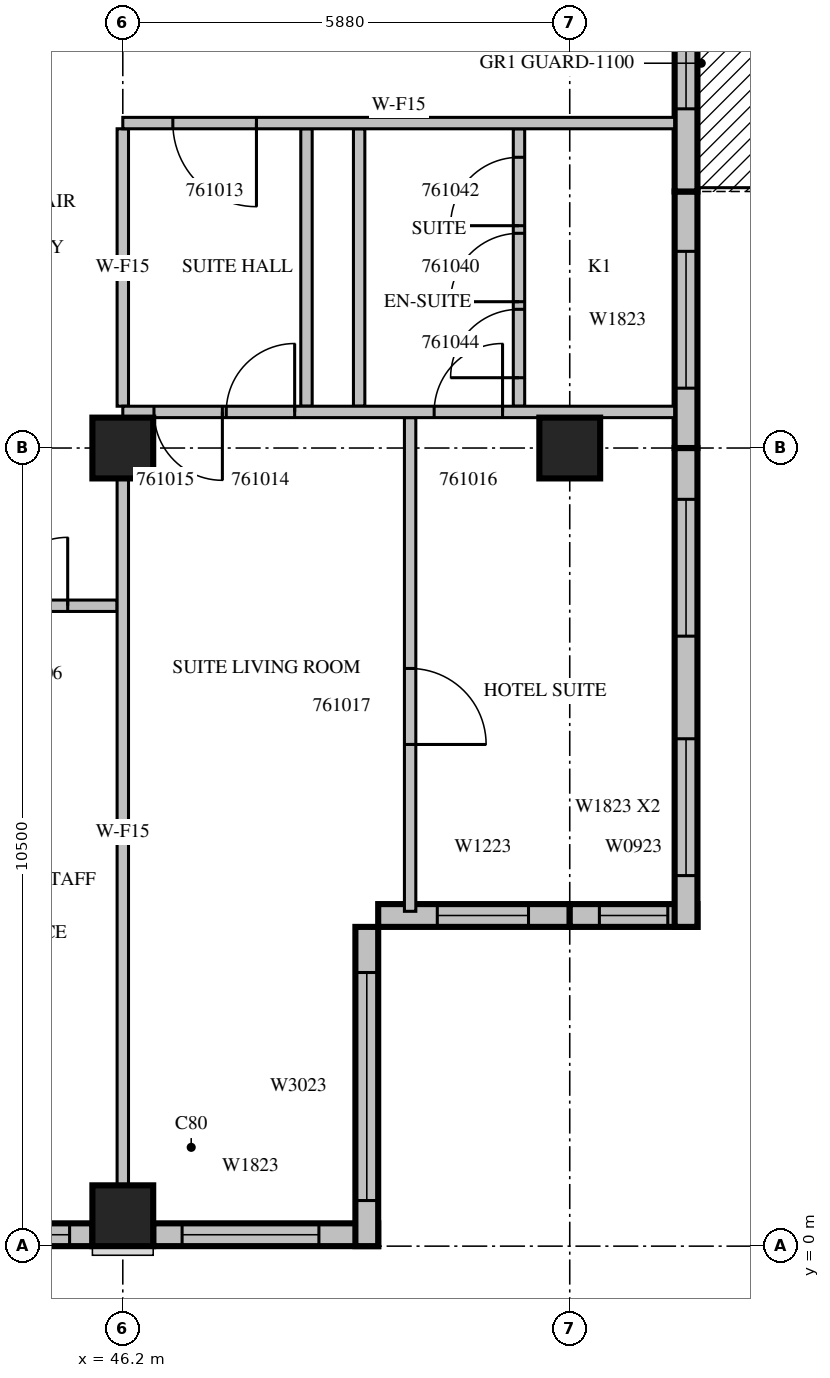
"""IFC4 building model, lengths in metres.
Left out: names, types, materials, properties, quantities, classifications, styles, units other than length and angle.
Written with IfcOpenShell. Run it as: python <this file> out.ifc"""

import sys

from ifc_helpers import new_model, si_unit, direction, frame, frame_2d, origin, origin_2d, place, context, subcontext, project, spatial, rectangle, extrude, source, transform, mapped, element, fill, save


model = new_model("IFC4")
c1 = context("Model", 3, precision=1e-05, world=origin(), true_north=direction((0.0, 1.0)))
c2 = subcontext(c1, "Body", "Model", "MODEL_VIEW")
j1 = project(units=[si_unit("LENGTHUNIT", "METRE"), si_unit("PLANEANGLEUNIT", "RADIAN")], contexts=[c1])
p1 = place(None, origin())
s1 = spatial("IfcSite", under=j1, at=p1, CompositionType="ELEMENT")
p2 = place(p1, origin())
s2 = spatial("IfcBuilding", under=s1, at=p2, CompositionType="ELEMENT")
p3 = place(p2, frame((0.0, 0.0, 265.2)))
s3 = spatial("IfcBuildingStorey", under=s2, at=p3, CompositionType="ELEMENT", Elevation=265.2)
m1 = source(origin(), c2, "Body", "SweptSolid", [
    extrude(rectangle(XDim=0.8, YDim=0.8, at=origin_2d()), origin(), (0.0, 0.0, 1.0), 3.8),
])
for number, where, z_axis, x_axis in (
    (1, (46.2, 0.4, 0.0), (0.0, 0.0, 1.0), (1.0, 0.0, 0.0)),
    (2, (46.2, 10.5, 0.0), (0.0, 0.0, 1.0), (1.0, 0.0, 0.0)),
    (3, (52.08, 10.5, 0.0), (0.0, 0.0, 1.0), (1.0, 0.0, 0.0)),
):
    element("IfcColumn", number, at=place(p3, frame(where, z_axis=z_axis, x_axis=x_axis)), inside=s3, PredefinedType="COLUMN", context=c2, shape_type="MappedRepresentation", body=[
        mapped(m1, transform((0.0, 0.0, 0.0), scale=1.0)),
    ])
m2 = source(origin(), c2, "Body", "SweptSolid", [
    extrude(rectangle(XDim=1.8, YDim=0.3, at=frame_2d((0.9, 0.0))), origin(), (0.0, 0.0, 1.0), 3.4),
])
p4 = place(p3, frame((44.0, 0.15, 0.0), z_axis=(0.0, 0.0, 1.0), x_axis=(1.0, 0.0, 0.0)))
e4 = element("IfcWall", 4, at=p4, inside=s3, PredefinedType="STANDARD", context=c2, shape_type="MappedRepresentation", body=[
    mapped(m2, transform((0.0, 0.0, 0.0), scale=1.0)),
])
m3 = source(origin(), c2, "Body", "SweptSolid", [
    extrude(rectangle(XDim=1.2, YDim=2.3, at=frame_2d((0.6, 1.15))), frame((0.0, 0.16, 0.0), z_axis=(0.0, -1.0, 0.0), x_axis=(1.0, 0.0, 0.0)), (0.0, 0.0, 1.0), 0.32),
])
p5 = place(p4, frame((0.3, 0.0, 0.6)))
e5 = element("IfcOpeningElement", 5, at=p5, cuts=e4, PredefinedType="OPENING", context=c2, shape_type="MappedRepresentation", body=[
    mapped(m3, transform((0.0, 0.0, 0.0), scale=1.0)),
])
m4 = source(origin(), c2, "Body", "SweptSolid", [
    extrude(rectangle(XDim=2.96, YDim=0.3, at=frame_2d((1.48, 0.0))), origin(), (0.0, 0.0, 1.0), 3.4),
])
p6 = place(p3, frame((46.6, 0.15, 0.0), z_axis=(0.0, 0.0, 1.0), x_axis=(1.0, 0.0, 0.0)))
e6 = element("IfcWall", 6, at=p6, inside=s3, PredefinedType="STANDARD", context=c2, shape_type="MappedRepresentation", body=[
    mapped(m4, transform((0.0, 0.0, 0.0), scale=1.0)),
])
m5 = source(origin(), c2, "Body", "SweptSolid", [
    extrude(rectangle(XDim=1.8, YDim=2.3, at=frame_2d((0.9, 1.15))), frame((0.0, 0.16, 0.0), z_axis=(0.0, -1.0, 0.0), x_axis=(1.0, 0.0, 0.0)), (0.0, 0.0, 1.0), 0.32),
])
p7 = place(p6, frame((0.38, 0.0, 0.6)))
e7 = element("IfcOpeningElement", 7, at=p7, cuts=e6, PredefinedType="OPENING", context=c2, shape_type="MappedRepresentation", body=[
    mapped(m5, transform((0.0, 0.0, 0.0), scale=1.0)),
])
m6 = source(origin(), c2, "Body", "SweptSolid", [
    extrude(rectangle(XDim=4.2, YDim=0.3, at=frame_2d((2.1, 0.0))), origin(), (0.0, 0.0, 1.0), 3.4),
])
p8 = place(p3, frame((49.41, 0.0, 0.0), z_axis=(0.0, 0.0, 1.0), x_axis=(0.0, 1.0, 0.0)))
e8 = element("IfcWall", 8, at=p8, inside=s3, PredefinedType="STANDARD", context=c2, shape_type="MappedRepresentation", body=[
    mapped(m6, transform((0.0, 0.0, 0.0), scale=1.0)),
])
m7 = source(origin(), c2, "Body", "SweptSolid", [
    extrude(rectangle(XDim=3.0, YDim=2.3, at=frame_2d((1.5, 1.15))), frame((0.0, 0.16, 0.0), z_axis=(0.0, -1.0, 0.0), x_axis=(1.0, 0.0, 0.0)), (0.0, 0.0, 1.0), 0.32),
])
p9 = place(p8, frame((0.6, 0.0, 0.6)))
e9 = element("IfcOpeningElement", 9, at=p9, cuts=e8, PredefinedType="OPENING", context=c2, shape_type="MappedRepresentation", body=[
    mapped(m7, transform((0.0, 0.0, 0.0), scale=1.0)),
])
m8 = source(origin(), c2, "Body", "SweptSolid", [
    extrude(rectangle(XDim=2.52, YDim=0.3, at=frame_2d((1.26, 0.0))), origin(), (0.0, 0.0, 1.0), 3.4),
])
p10 = place(p3, frame((49.56, 4.35, 0.0), z_axis=(0.0, 0.0, 1.0), x_axis=(1.0, 0.0, 0.0)))
e10 = element("IfcWall", 10, at=p10, inside=s3, PredefinedType="STANDARD", context=c2, shape_type="MappedRepresentation", body=[
    mapped(m8, transform((0.0, 0.0, 0.0), scale=1.0)),
])
p11 = place(p10, frame((0.777, 0.0, 0.6)))
e11 = element("IfcOpeningElement", 11, at=p11, cuts=e10, PredefinedType="OPENING", context=c2, shape_type="MappedRepresentation", body=[
    mapped(m3, transform((0.0, 0.0, 0.0), scale=1.0)),
])
m9 = source(origin(), c2, "Body", "SweptSolid", [
    extrude(rectangle(XDim=1.68, YDim=0.3, at=frame_2d((0.84, 0.0))), origin(), (0.0, 0.0, 1.0), 3.4),
])
p12 = place(p3, frame((52.08, 4.35, 0.0), z_axis=(0.0, 0.0, 1.0), x_axis=(1.0, 0.0, 0.0)))
e12 = element("IfcWall", 12, at=p12, inside=s3, PredefinedType="STANDARD", context=c2, shape_type="MappedRepresentation", body=[
    mapped(m9, transform((0.0, 0.0, 0.0), scale=1.0)),
])
m10 = source(origin(), c2, "Body", "SweptSolid", [
    extrude(rectangle(XDim=0.9, YDim=2.3, at=frame_2d((0.45, 1.15))), frame((0.0, 0.16, 0.0), z_axis=(0.0, -1.0, 0.0), x_axis=(1.0, 0.0, 0.0)), (0.0, 0.0, 1.0), 0.32),
])
p13 = place(p12, frame((0.39, 0.0, 0.6)))
e13 = element("IfcOpeningElement", 13, at=p13, cuts=e12, PredefinedType="OPENING", context=c2, shape_type="MappedRepresentation", body=[
    mapped(m10, transform((0.0, 0.0, 0.0), scale=1.0)),
])
m11 = source(origin(), c2, "Body", "SweptSolid", [
    extrude(rectangle(XDim=6.3, YDim=0.3, at=frame_2d((3.15, 0.0))), origin(), (0.0, 0.0, 1.0), 3.4),
])
p14 = place(p3, frame((53.61, 4.2, 0.0), z_axis=(0.0, 0.0, 1.0), x_axis=(0.0, 1.0, 0.0)))
e14 = element("IfcWall", 14, at=p14, inside=s3, PredefinedType="STANDARD", context=c2, shape_type="MappedRepresentation", body=[
    mapped(m11, transform((0.0, 0.0, 0.0), scale=1.0)),
])
p15 = place(p14, frame((0.675, 0.0, 0.6)))
e15 = element("IfcOpeningElement", 15, at=p15, cuts=e14, PredefinedType="OPENING", context=c2, shape_type="MappedRepresentation", body=[
    mapped(m5, transform((0.0, 0.0, 0.0), scale=1.0)),
])
p16 = place(p14, frame((3.825, 0.0, 0.6)))
e16 = element("IfcOpeningElement", 16, at=p16, cuts=e14, PredefinedType="OPENING", context=c2, shape_type="MappedRepresentation", body=[
    mapped(m5, transform((0.0, 0.0, 0.0), scale=1.0)),
])
m12 = source(origin(), c2, "Body", "SweptSolid", [
    extrude(rectangle(XDim=3.375, YDim=0.3, at=frame_2d((1.688, 0.0))), origin(), (0.0, 0.0, 1.0), 3.4),
])
p17 = place(p3, frame((53.61, 10.5, 0.0), z_axis=(0.0, 0.0, 1.0), x_axis=(0.0, 1.0, 0.0)))
e17 = element("IfcWall", 17, at=p17, inside=s3, PredefinedType="STANDARD", context=c2, shape_type="MappedRepresentation", body=[
    mapped(m12, transform((0.0, 0.0, 0.0), scale=1.0)),
])
p18 = place(p17, frame((0.787, 0.0, 0.6)))
e18 = element("IfcOpeningElement", 18, at=p18, cuts=e17, PredefinedType="OPENING", context=c2, shape_type="MappedRepresentation", body=[
    mapped(m5, transform((0.0, 0.0, 0.0), scale=1.0)),
])
p19 = place(p3, frame((53.61, 13.875, 0.0), z_axis=(0.0, 0.0, 1.0), x_axis=(0.0, 1.0, 0.0)))
e19 = element("IfcWall", 19, at=p19, inside=s3, PredefinedType="STANDARD", context=c2, shape_type="MappedRepresentation", body=[
    mapped(m12, transform((0.0, 0.0, 0.0), scale=1.0)),
])
m13 = source(origin(), c2, "Body", "SweptSolid", [
    extrude(rectangle(XDim=1.8, YDim=2.4, at=frame_2d((0.9, 1.2))), frame((0.0, 0.16, 0.0), z_axis=(0.0, -1.0, 0.0), x_axis=(1.0, 0.0, 0.0)), (0.0, 0.0, 1.0), 0.32),
])
p20 = place(p19, frame((1.087, 0.0, 0.0)))
e20 = element("IfcOpeningElement", 20, at=p20, cuts=e19, PredefinedType="OPENING", context=c2, shape_type="MappedRepresentation", body=[
    mapped(m13, transform((0.0, 0.0, 0.0), scale=1.0)),
])
m14 = source(origin(), c2, "Body", "SweptSolid", [
    extrude(rectangle(XDim=2.2, YDim=0.15, at=frame_2d((1.1, 0.0))), origin(), (0.0, 0.0, 1.0), 3.4),
])
p21 = place(p3, frame((46.125, 8.425, 0.0), z_axis=(0.0, 0.0, 1.0), x_axis=(-1.0, 0.0, 0.0)))
e21 = element("IfcWall", 21, at=p21, inside=s3, PredefinedType="PARTITIONING", context=c2, shape_type="MappedRepresentation", body=[
    mapped(m14, transform((0.0, 0.0, 0.0), scale=1.0)),
])
m15 = source(origin(), c2, "Body", "SweptSolid", [
    extrude(rectangle(XDim=0.9, YDim=2.1, at=frame_2d((0.45, 1.05))), frame((0.0, 0.085, 0.0), z_axis=(0.0, -1.0, 0.0), x_axis=(1.0, 0.0, 0.0)), (0.0, 0.0, 1.0), 0.17),
])
p22 = place(p21, frame((0.65, 0.0, 0.0)))
e22 = element("IfcOpeningElement", 22, at=p22, cuts=e21, PredefinedType="OPENING", context=c2, shape_type="MappedRepresentation", body=[
    mapped(m15, transform((0.0, 0.0, 0.0), scale=1.0)),
])
m16 = source(origin(), c2, "Body", "SweptSolid", [
    extrude(rectangle(XDim=6.495, YDim=0.15, at=frame_2d((3.248, 0.0))), origin(), (0.0, 0.0, 1.0), 3.4),
])
p23 = place(p3, frame((49.98, 4.405, 0.0), z_axis=(0.0, 0.0, 1.0), x_axis=(0.0, 1.0, 0.0)))
e23 = element("IfcWall", 23, at=p23, inside=s3, PredefinedType="PARTITIONING", context=c2, shape_type="MappedRepresentation", body=[
    mapped(m16, transform((0.0, 0.0, 0.0), scale=1.0)),
])
m17 = source(origin(), c2, "Body", "SweptSolid", [
    extrude(rectangle(XDim=1.0, YDim=2.1, at=frame_2d((0.5, 1.05))), frame((0.0, 0.085, 0.0), z_axis=(0.0, -1.0, 0.0), x_axis=(1.0, 0.0, 0.0)), (0.0, 0.0, 1.0), 0.17),
])
p24 = place(p23, frame((2.195, 0.0, 0.0)))
e24 = element("IfcOpeningElement", 24, at=p24, cuts=e23, PredefinedType="OPENING", context=c2, shape_type="MappedRepresentation", body=[
    mapped(m17, transform((0.0, 0.0, 0.0), scale=1.0)),
])
m18 = source(origin(), c2, "Body", "SweptSolid", [
    extrude(rectangle(XDim=3.65, YDim=0.15, at=frame_2d((1.825, 0.0))), origin(), (0.0, 0.0, 1.0), 3.4),
])
for number, where, z_axis, x_axis in (
    (25, (48.617, 11.05, 0.0), (0.0, 0.0, 1.0), (0.0, 1.0, 0.0)),
    (26, (49.309, 11.05, 0.0), (0.0, 0.0, 1.0), (0.0, 1.0, 0.0)),
):
    element("IfcWall", number, at=place(p3, frame(where, z_axis=z_axis, x_axis=x_axis)), inside=s3, PredefinedType="PARTITIONING", context=c2, shape_type="MappedRepresentation", body=[
        mapped(m18, transform((0.0, 0.0, 0.0), scale=1.0)),
    ])
p25 = place(p3, frame((51.412, 11.05, 0.0), z_axis=(0.0, 0.0, 1.0), x_axis=(0.0, 1.0, 0.0)))
e27 = element("IfcWall", 27, at=p25, inside=s3, PredefinedType="PARTITIONING", context=c2, shape_type="MappedRepresentation", body=[
    mapped(m18, transform((0.0, 0.0, 0.0), scale=1.0)),
])
p26 = place(p25, frame((1.375, 0.0, 0.0)))
e28 = element("IfcOpeningElement", 28, at=p26, cuts=e27, PredefinedType="OPENING", context=c2, shape_type="MappedRepresentation", body=[
    mapped(m15, transform((0.0, 0.0, 0.0), scale=1.0)),
])
p27 = place(p25, frame((2.375, 0.0, 0.0)))
e29 = element("IfcOpeningElement", 29, at=p27, cuts=e27, PredefinedType="OPENING", context=c2, shape_type="MappedRepresentation", body=[
    mapped(m15, transform((0.0, 0.0, 0.0), scale=1.0)),
])
p28 = place(p25, frame((0.375, 0.0, 0.0)))
e30 = element("IfcOpeningElement", 30, at=p28, cuts=e27, PredefinedType="OPENING", context=c2, shape_type="MappedRepresentation", body=[
    mapped(m15, transform((0.0, 0.0, 0.0), scale=1.0)),
])
m19 = source(origin(), c2, "Body", "SweptSolid", [
    extrude(rectangle(XDim=9.302, YDim=0.15, at=frame_2d((4.651, 0.0))), origin(), (0.0, 0.0, 1.0), 3.4),
])
p29 = place(p3, frame((46.2, 0.799, 0.0), z_axis=(0.0, 0.0, 1.0), x_axis=(0.0, 1.0, 0.0)))
e31 = element("IfcWall", 31, at=p29, inside=s3, PredefinedType="PARTITIONING", context=c2, shape_type="MappedRepresentation", body=[
    mapped(m19, transform((0.0, 0.0, 0.0), scale=1.0)),
])
p30 = place(p3, frame((46.2, 11.05, 0.0), z_axis=(0.0, 0.0, 1.0), x_axis=(0.0, 1.0, 0.0)))
e32 = element("IfcWall", 32, at=p30, inside=s3, PredefinedType="PARTITIONING", context=c2, shape_type="MappedRepresentation", body=[
    mapped(m18, transform((0.0, 0.0, 0.0), scale=1.0)),
])
m20 = source(origin(), c2, "Body", "SweptSolid", [
    extrude(rectangle(XDim=7.26, YDim=0.15, at=frame_2d((3.63, 0.0))), origin(), (0.0, 0.0, 1.0), 3.4),
])
p31 = place(p3, frame((53.46, 10.975, 0.0), z_axis=(0.0, 0.0, 1.0), x_axis=(-1.0, 0.0, 0.0)))
e33 = element("IfcWall", 33, at=p31, inside=s3, PredefinedType="PARTITIONING", context=c2, shape_type="MappedRepresentation", body=[
    mapped(m20, transform((0.0, 0.0, 0.0), scale=1.0)),
])
p32 = place(p31, frame((4.999, 0.0, 0.0)))
e34 = element("IfcOpeningElement", 34, at=p32, cuts=e33, PredefinedType="OPENING", context=c2, shape_type="MappedRepresentation", body=[
    mapped(m15, transform((0.0, 0.0, 0.0), scale=1.0)),
])
p33 = place(p31, frame((5.95, 0.0, 0.0)))
e35 = element("IfcOpeningElement", 35, at=p33, cuts=e33, PredefinedType="OPENING", context=c2, shape_type="MappedRepresentation", body=[
    mapped(m15, transform((0.0, 0.0, 0.0), scale=1.0)),
])
p34 = place(p31, frame((2.264, 0.0, 0.0)))
e36 = element("IfcOpeningElement", 36, at=p34, cuts=e33, PredefinedType="OPENING", context=c2, shape_type="MappedRepresentation", body=[
    mapped(m15, transform((0.0, 0.0, 0.0), scale=1.0)),
])
p35 = place(p3, frame((53.46, 14.775, 0.0), z_axis=(0.0, 0.0, 1.0), x_axis=(-1.0, 0.0, 0.0)))
e37 = element("IfcWall", 37, at=p35, inside=s3, PredefinedType="PARTITIONING", context=c2, shape_type="MappedRepresentation", body=[
    mapped(m20, transform((0.0, 0.0, 0.0), scale=1.0)),
])
m21 = source(origin(), c2, "Body", "SweptSolid", [
    extrude(rectangle(XDim=1.1, YDim=2.1, at=frame_2d((0.55, 1.05))), frame((0.0, 0.085, 0.0), z_axis=(0.0, -1.0, 0.0), x_axis=(1.0, 0.0, 0.0)), (0.0, 0.0, 1.0), 0.17),
])
p36 = place(p35, frame((5.502, 0.0, 0.0)))
e38 = element("IfcOpeningElement", 38, at=p36, cuts=e37, PredefinedType="OPENING", context=c2, shape_type="MappedRepresentation", body=[
    mapped(m21, transform((0.0, 0.0, 0.0), scale=1.0)),
])
m22 = source(origin(), c2, "Body", "SweptSolid", [
    extrude(rectangle(XDim=1.2, YDim=2.3, at=frame_2d((0.6, 1.15))), frame((0.0, 0.03, 0.0), z_axis=(0.0, -1.0, 0.0), x_axis=(1.0, 0.0, 0.0)), (0.0, 0.0, 1.0), 0.06),
])
p37 = place(p5, origin())
e39 = element("IfcWindow", 39, at=p37, inside=s3, PartitioningType="SINGLE_PANEL", PredefinedType="WINDOW", context=c2, shape_type="MappedRepresentation", body=[
    mapped(m22, transform((0.0, 0.0, 0.0), scale=1.0)),
])
fill(e5, e39)
m23 = source(origin(), c2, "Body", "SweptSolid", [
    extrude(rectangle(XDim=1.8, YDim=2.3, at=frame_2d((0.9, 1.15))), frame((0.0, 0.03, 0.0), z_axis=(0.0, -1.0, 0.0), x_axis=(1.0, 0.0, 0.0)), (0.0, 0.0, 1.0), 0.06),
])
p38 = place(p7, origin())
e40 = element("IfcWindow", 40, at=p38, inside=s3, PartitioningType="SINGLE_PANEL", PredefinedType="WINDOW", context=c2, shape_type="MappedRepresentation", body=[
    mapped(m23, transform((0.0, 0.0, 0.0), scale=1.0)),
])
fill(e7, e40)
m24 = source(origin(), c2, "Body", "SweptSolid", [
    extrude(rectangle(XDim=3.0, YDim=2.3, at=frame_2d((1.5, 1.15))), frame((0.0, 0.03, 0.0), z_axis=(0.0, -1.0, 0.0), x_axis=(1.0, 0.0, 0.0)), (0.0, 0.0, 1.0), 0.06),
])
p39 = place(p9, origin())
e41 = element("IfcWindow", 41, at=p39, inside=s3, PartitioningType="SINGLE_PANEL", PredefinedType="WINDOW", context=c2, shape_type="MappedRepresentation", body=[
    mapped(m24, transform((0.0, 0.0, 0.0), scale=1.0)),
])
fill(e9, e41)
p40 = place(p11, origin())
e42 = element("IfcWindow", 42, at=p40, inside=s3, PartitioningType="SINGLE_PANEL", PredefinedType="WINDOW", context=c2, shape_type="MappedRepresentation", body=[
    mapped(m22, transform((0.0, 0.0, 0.0), scale=1.0)),
])
fill(e11, e42)
m25 = source(origin(), c2, "Body", "SweptSolid", [
    extrude(rectangle(XDim=0.9, YDim=2.3, at=frame_2d((0.45, 1.15))), frame((0.0, 0.03, 0.0), z_axis=(0.0, -1.0, 0.0), x_axis=(1.0, 0.0, 0.0)), (0.0, 0.0, 1.0), 0.06),
])
p41 = place(p13, origin())
e43 = element("IfcWindow", 43, at=p41, inside=s3, PartitioningType="SINGLE_PANEL", PredefinedType="WINDOW", context=c2, shape_type="MappedRepresentation", body=[
    mapped(m25, transform((0.0, 0.0, 0.0), scale=1.0)),
])
fill(e13, e43)
p42 = place(p15, origin())
e44 = element("IfcWindow", 44, at=p42, inside=s3, PartitioningType="SINGLE_PANEL", PredefinedType="WINDOW", context=c2, shape_type="MappedRepresentation", body=[
    mapped(m23, transform((0.0, 0.0, 0.0), scale=1.0)),
])
fill(e15, e44)
p43 = place(p16, origin())
e45 = element("IfcWindow", 45, at=p43, inside=s3, PartitioningType="SINGLE_PANEL", PredefinedType="WINDOW", context=c2, shape_type="MappedRepresentation", body=[
    mapped(m23, transform((0.0, 0.0, 0.0), scale=1.0)),
])
fill(e16, e45)
p44 = place(p18, origin())
e46 = element("IfcWindow", 46, at=p44, inside=s3, PartitioningType="SINGLE_PANEL", PredefinedType="WINDOW", context=c2, shape_type="MappedRepresentation", body=[
    mapped(m23, transform((0.0, 0.0, 0.0), scale=1.0)),
])
fill(e18, e46)
m26 = source(origin(), c2, "Body", "SweptSolid", [
    extrude(rectangle(XDim=1.8, YDim=2.4, at=frame_2d((0.9, 1.2))), frame((0.0, 0.025, 0.0), z_axis=(0.0, -1.0, 0.0), x_axis=(1.0, 0.0, 0.0)), (0.0, 0.0, 1.0), 0.05),
])
p45 = place(p20, origin())
e47 = element("IfcDoor", 47, at=p45, inside=s3, OperationType="SLIDING_TO_LEFT", PredefinedType="DOOR", context=c2, shape_type="MappedRepresentation", body=[
    mapped(m26, transform((0.0, 0.0, 0.0), scale=1.0)),
])
fill(e20, e47)
m27 = source(origin(), c2, "Body", "SweptSolid", [
    extrude(rectangle(XDim=0.9, YDim=2.1, at=frame_2d((0.45, 1.05))), frame((0.0, 0.025, 0.0), z_axis=(0.0, -1.0, 0.0), x_axis=(1.0, 0.0, 0.0)), (0.0, 0.0, 1.0), 0.05),
])
p46 = place(p22, origin())
e48 = element("IfcDoor", 48, at=p46, inside=s3, OperationType="SINGLE_SWING_RIGHT", PredefinedType="DOOR", context=c2, shape_type="MappedRepresentation", body=[
    mapped(m27, transform((0.0, 0.0, 0.0), scale=1.0)),
])
fill(e22, e48)
m28 = source(origin(), c2, "Body", "SweptSolid", [
    extrude(rectangle(XDim=1.1, YDim=2.1, at=frame_2d((0.55, 1.05))), frame((0.0, 0.025, 0.0), z_axis=(0.0, -1.0, 0.0), x_axis=(1.0, 0.0, 0.0)), (0.0, 0.0, 1.0), 0.05),
])
p47 = place(p36, origin())
e49 = element("IfcDoor", 49, at=p47, inside=s3, OperationType="SINGLE_SWING_LEFT", PredefinedType="DOOR", context=c2, shape_type="MappedRepresentation", body=[
    mapped(m28, transform((0.0, 0.0, 0.0), scale=1.0)),
])
fill(e38, e49)
p48 = place(p32, origin())
e50 = element("IfcDoor", 50, at=p48, inside=s3, OperationType="SINGLE_SWING_RIGHT", PredefinedType="DOOR", context=c2, shape_type="MappedRepresentation", body=[
    mapped(m27, transform((0.0, 0.0, 0.0), scale=1.0)),
])
fill(e34, e50)
p49 = place(p33, origin())
e51 = element("IfcDoor", 51, at=p49, inside=s3, OperationType="SINGLE_SWING_LEFT", PredefinedType="DOOR", context=c2, shape_type="MappedRepresentation", body=[
    mapped(m27, transform((0.0, 0.0, 0.0), scale=1.0)),
])
fill(e35, e51)
p50 = place(p34, origin())
e52 = element("IfcDoor", 52, at=p50, inside=s3, OperationType="SINGLE_SWING_RIGHT", PredefinedType="DOOR", context=c2, shape_type="MappedRepresentation", body=[
    mapped(m27, transform((0.0, 0.0, 0.0), scale=1.0)),
])
fill(e36, e52)
m29 = source(origin(), c2, "Body", "SweptSolid", [
    extrude(rectangle(XDim=1.0, YDim=2.1, at=frame_2d((0.5, 1.05))), frame((0.0, 0.025, 0.0), z_axis=(0.0, -1.0, 0.0), x_axis=(1.0, 0.0, 0.0)), (0.0, 0.0, 1.0), 0.05),
])
p51 = place(p24, origin())
e53 = element("IfcDoor", 53, at=p51, inside=s3, OperationType="SINGLE_SWING_RIGHT", PredefinedType="DOOR", context=c2, shape_type="MappedRepresentation", body=[
    mapped(m29, transform((0.0, 0.0, 0.0), scale=1.0)),
])
fill(e24, e53)
p52 = place(p26, origin())
e54 = element("IfcDoor", 54, at=p52, inside=s3, OperationType="SINGLE_SWING_LEFT", PredefinedType="DOOR", context=c2, shape_type="MappedRepresentation", body=[
    mapped(m27, transform((0.0, 0.0, 0.0), scale=1.0)),
])
fill(e28, e54)
p53 = place(p27, origin())
e55 = element("IfcDoor", 55, at=p53, inside=s3, OperationType="SINGLE_SWING_LEFT", PredefinedType="DOOR", context=c2, shape_type="MappedRepresentation", body=[
    mapped(m27, transform((0.0, 0.0, 0.0), scale=1.0)),
])
fill(e29, e55)
p54 = place(p28, origin())
e56 = element("IfcDoor", 56, at=p54, inside=s3, OperationType="SINGLE_SWING_LEFT", PredefinedType="DOOR", context=c2, shape_type="MappedRepresentation", body=[
    mapped(m27, transform((0.0, 0.0, 0.0), scale=1.0)),
])
fill(e30, e56)
save(model, sys.argv[1])
